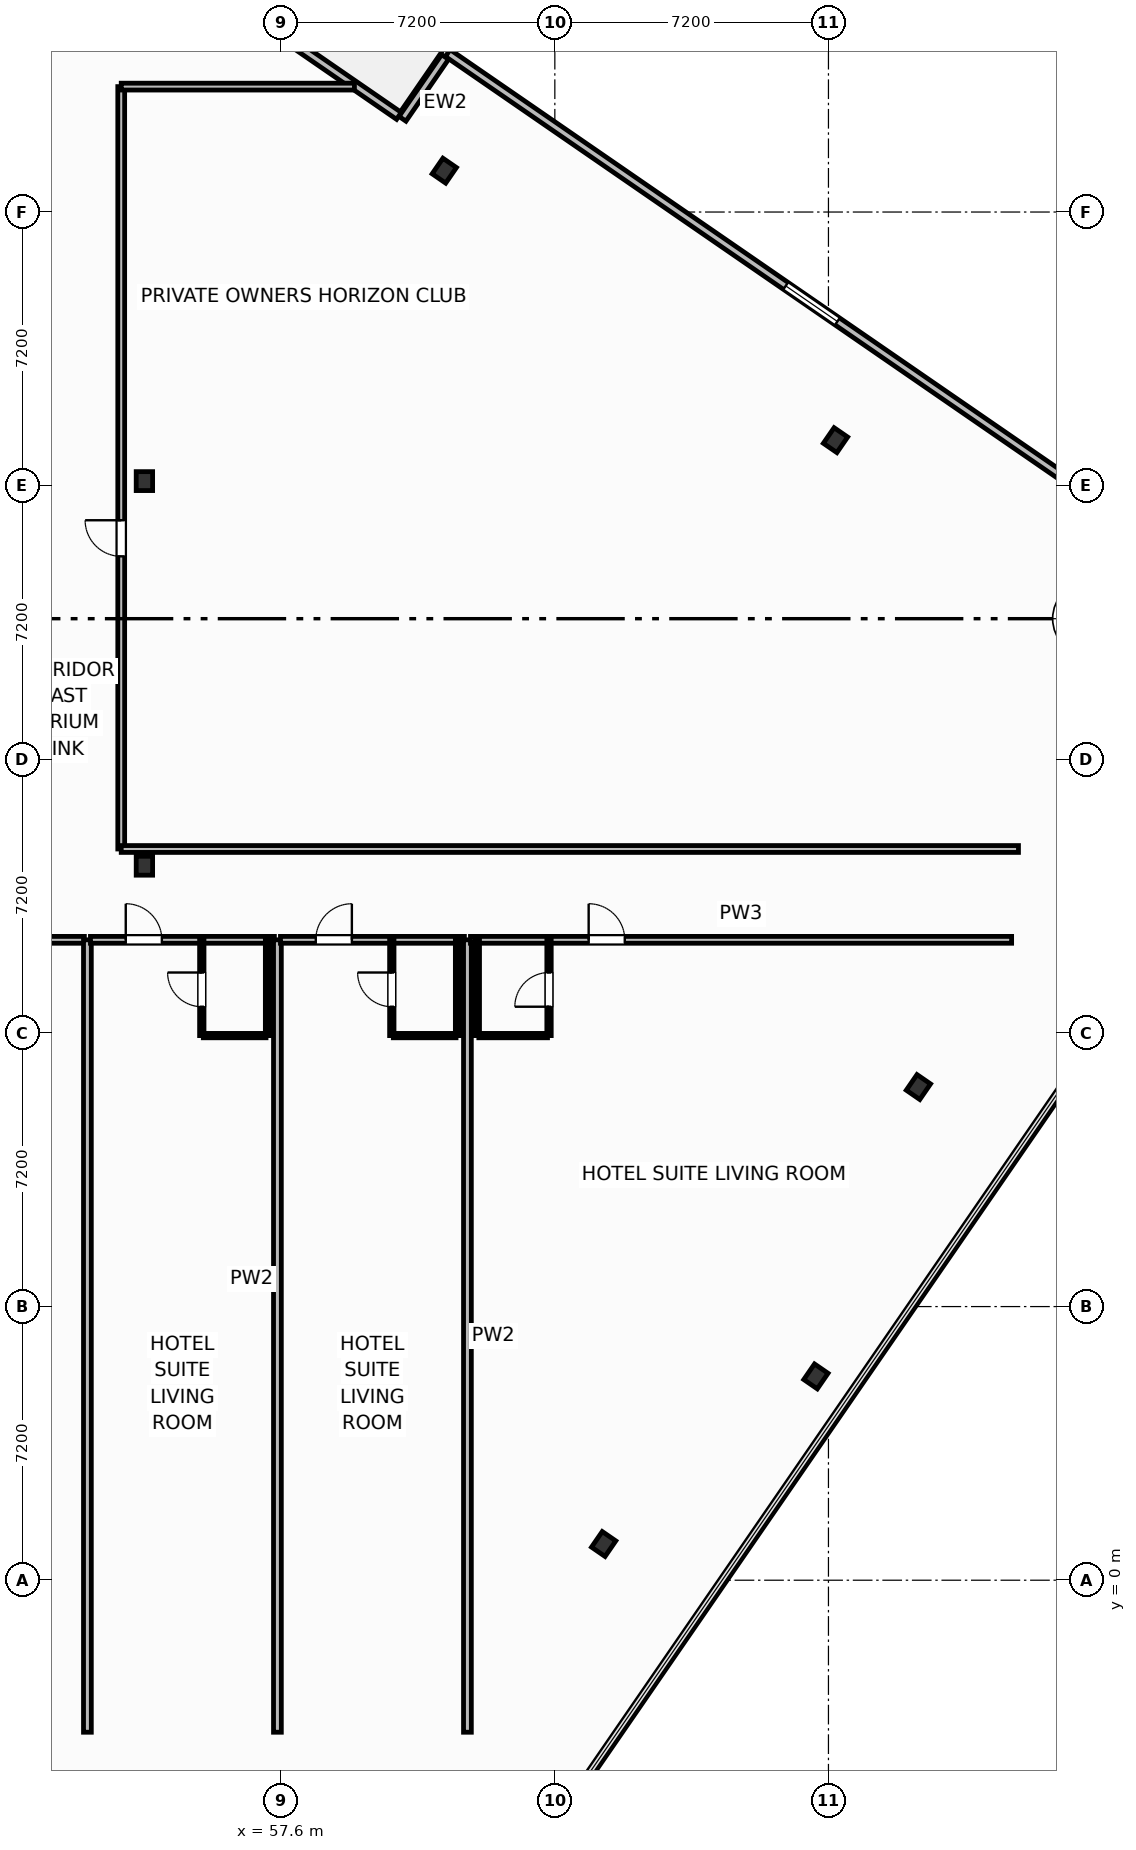
"""IFC4 building model, lengths in metres.
Left out: names, types, materials, properties, quantities, classifications, styles, units other than length and angle.
Written with IfcOpenShell. Run it as: python <this file> out.ifc"""

import sys

from ifc_helpers import new_model, si_unit, direction, frame, frame_2d, origin, origin_2d, place, context, subcontext, project, spatial, rectangle, i_section, extrude, element, fill, save


model = new_model("IFC4")
c1 = context("Model", 3, precision=1e-05, world=origin(), true_north=direction((0.0, 1.0)))
c2 = subcontext(c1, "Body", "Model", "MODEL_VIEW")
j1 = project(units=[si_unit("LENGTHUNIT", "METRE"), si_unit("PLANEANGLEUNIT", "RADIAN")], contexts=[c1])
p1 = place(None, origin())
s1 = spatial("IfcSite", under=j1, at=p1, CompositionType="ELEMENT")
p2 = place(p1, origin())
s2 = spatial("IfcBuilding", under=s1, at=p2, CompositionType="ELEMENT")
p3 = place(p2, frame((0.0, 0.0, 27.0)))
s3 = spatial("IfcBuildingStorey", under=s2, at=p3, CompositionType="ELEMENT", Elevation=27.0)
for number, where, z_axis, x_axis in (
    (1, (54.0, 18.8, 0.0), (0.0, 0.0, 1.0), (1.0, 0.0, 0.0)),
    (2, (54.0, 28.92, 0.0), (0.0, 0.0, 1.0), (1.0, 0.0, 0.0)),
):
    element("IfcColumn", number, at=place(p3, frame(where, z_axis=z_axis, x_axis=x_axis)), inside=s3, PredefinedType="COLUMN", context=c2, shape_type="SweptSolid", body=[
        extrude(i_section(OverallWidth=0.432, OverallDepth=0.498, WebThickness=0.056, FlangeThickness=0.089, FilletRadius=0.025, at=origin_2d()), origin(), (0.0, 0.0, 1.0), 3.7),
    ])
for number, where, z_axis, x_axis in (
    (3, (66.085, 0.953, -0.25), (0.0, 0.0, 1.0), (0.824, -0.567, 0.0)),
    (4, (71.67, 5.363, -0.25), (0.0, 0.0, 1.0), (0.824, -0.567, 0.0)),
    (5, (74.367, 12.976, -0.25), (0.0, 0.0, 1.0), (0.824, -0.567, 0.0)),
    (6, (72.186, 29.997, -0.25), (0.0, 0.0, 1.0), (0.824, -0.567, 0.0)),
    (7, (61.891, 37.088, -0.25), (0.0, 0.0, 1.0), (0.824, -0.567, 0.0)),
):
    element("IfcColumn", number, at=place(p3, frame(where, z_axis=z_axis, x_axis=x_axis)), inside=s3, PredefinedType="COLUMN", context=c2, shape_type="SweptSolid", body=[
        extrude(i_section(OverallWidth=0.432, OverallDepth=0.498, WebThickness=0.056, FlangeThickness=0.089, FilletRadius=0.025, at=origin_2d()), origin(), (0.0, 0.0, 1.0), 3.95),
    ])
p4 = place(p3, frame((55.757, 41.933, 0.0), z_axis=(0.0, 0.0, 1.0), x_axis=(0.823534636215, -0.567265989598, 0.0)))
e8 = element("IfcWall", 8, at=p4, inside=s3, PredefinedType="SOLIDWALL", context=c2, shape_type="SweptSolid", body=[
    extrude(rectangle(XDim=6.0, YDim=0.22, at=frame_2d((3.0, 0.0))), origin(), (0.0, 0.0, 1.0), 2.73),
])
p5 = place(p4, frame((0.4, 0.0, 0.0)))
e9 = element("IfcOpeningElement", 9, at=p5, cuts=e8, PredefinedType="OPENING", context=c2, shape_type="SweptSolid", body=[
    extrude(rectangle(XDim=1.5, YDim=2.25, at=frame_2d((0.75, 1.125))), frame((0.0, 0.12, 0.0), z_axis=(0.0, -1.0, 0.0), x_axis=(1.0, 0.0, 0.0)), (0.0, 0.0, 1.0), 0.24),
])
p6 = place(p3, frame((33.518, -1.362, 0.0), z_axis=(0.0, 0.0, 1.0), x_axis=(0.82353935489, -0.567259139148, 0.0)))
e10 = element("IfcWall", 10, at=p6, inside=s3, PredefinedType="SOLIDWALL", context=c2, shape_type="SweptSolid", body=[
    extrude(rectangle(XDim=23.147, YDim=0.22, at=frame_2d((11.573, 0.0))), origin(), (0.0, 0.0, 1.0), 2.73),
])
p7 = place(p6, frame((10.749, 0.0, 0.8)))
e11 = element("IfcOpeningElement", 11, at=p7, cuts=e10, PredefinedType="OPENING", context=c2, shape_type="SweptSolid", body=[
    extrude(rectangle(XDim=1.65, YDim=1.65, at=frame_2d((0.825, 0.825))), frame((0.0, 0.12, 0.0), z_axis=(0.0, -1.0, 0.0), x_axis=(1.0, 0.0, 0.0)), (0.0, 0.0, 1.0), 0.24),
])
p8 = place(p3, frame((81.127, 26.995, 0.0), z_axis=(0.0, 0.0, 1.0), x_axis=(-0.823530169317, 0.567272474411, 0.0)))
e12 = element("IfcWall", 12, at=p8, inside=s3, PredefinedType="SOLIDWALL", context=c2, shape_type="SweptSolid", body=[
    extrude(rectangle(XDim=23.247, YDim=0.22, at=frame_2d((11.624, 0.0))), origin(), (0.0, 0.0, 1.0), 2.73),
])
p9 = place(p8, frame((10.799, 0.0, 0.8)))
e13 = element("IfcOpeningElement", 13, at=p9, cuts=e12, PredefinedType="OPENING", context=c2, shape_type="SweptSolid", body=[
    extrude(rectangle(XDim=1.65, YDim=1.65, at=frame_2d((0.825, 0.825))), frame((0.0, 0.12, 0.0), z_axis=(0.0, -1.0, 0.0), x_axis=(1.0, 0.0, 0.0)), (0.0, 0.0, 1.0), 0.24),
])
p10 = place(p3, frame((61.912, 40.079, 0.0), z_axis=(0.0, 0.0, 1.0), x_axis=(-0.567189720735, -0.82358716642, 0.0)))
e14 = element("IfcWall", 14, at=p10, inside=s3, PredefinedType="SOLIDWALL", context=c2, shape_type="SweptSolid", body=[
    extrude(rectangle(XDim=1.975, YDim=0.22, at=frame_2d((0.987, 0.0))), origin(), (0.0, 0.0, 1.0), 2.73),
])
p11 = place(p3, frame((47.58, 16.85, 0.0), z_axis=(0.0, 0.0, 1.0), x_axis=(1.0, 0.0, 0.0)))
e15 = element("IfcWall", 15, at=p11, inside=s3, PredefinedType="PARTITIONING", context=c2, shape_type="SweptSolid", body=[
    extrude(rectangle(XDim=4.84, YDim=0.18, at=frame_2d((2.42, 0.0))), origin(), (0.0, 0.0, 1.0), 3.45),
])
p12 = place(p11, frame((2.819, 0.0, 0.0)))
e16 = element("IfcOpeningElement", 16, at=p12, cuts=e15, PredefinedType="OPENING", context=c2, shape_type="SweptSolid", body=[
    extrude(rectangle(XDim=0.95, YDim=2.15, at=frame_2d((0.475, 1.075))), frame((0.0, 0.1, 0.0), z_axis=(0.0, -1.0, 0.0), x_axis=(1.0, 0.0, 0.0)), (0.0, 0.0, 1.0), 0.2),
])
p13 = place(p3, frame((52.5, -4.0, 0.0), z_axis=(0.0, 0.0, 1.0), x_axis=(0.0, 1.0, 0.0)))
e17 = element("IfcWall", 17, at=p13, inside=s3, PredefinedType="PARTITIONING", context=c2, shape_type="SweptSolid", body=[
    extrude(rectangle(XDim=20.85, YDim=0.205, at=frame_2d((10.425, 0.0))), origin(), (0.0, 0.0, 1.0), 3.45),
])
p14 = place(p3, frame((52.58, 16.85, 0.0), z_axis=(0.0, 0.0, 1.0), x_axis=(1.0, 0.0, 0.0)))
e18 = element("IfcWall", 18, at=p14, inside=s3, PredefinedType="PARTITIONING", context=c2, shape_type="SweptSolid", body=[
    extrude(rectangle(XDim=4.84, YDim=0.18, at=frame_2d((2.42, 0.0))), origin(), (0.0, 0.0, 1.0), 3.45),
])
p15 = place(p14, frame((0.929, 0.0, 0.0)))
e19 = element("IfcOpeningElement", 19, at=p15, cuts=e18, PredefinedType="OPENING", context=c2, shape_type="SweptSolid", body=[
    extrude(rectangle(XDim=0.95, YDim=2.15, at=frame_2d((0.475, 1.075))), frame((0.0, 0.1, 0.0), z_axis=(0.0, -1.0, 0.0), x_axis=(1.0, 0.0, 0.0)), (0.0, 0.0, 1.0), 0.2),
])
p16 = place(p3, frame((55.55, 14.33, 0.0), z_axis=(0.0, 0.0, 1.0), x_axis=(1.0, 0.0, 0.0)))
e20 = element("IfcWall", 20, at=p16, inside=s3, PredefinedType="PARTITIONING", context=c2, shape_type="SweptSolid", body=[
    extrude(rectangle(XDim=1.65, YDim=0.115, at=frame_2d((0.825, 0.0))), origin(), (0.0, 0.0, 1.0), 3.45),
])
p17 = place(p3, frame((55.51, 14.33, 0.0), z_axis=(0.0, 0.0, 1.0), x_axis=(0.0, 1.0, 0.0)))
e21 = element("IfcWall", 21, at=p17, inside=s3, PredefinedType="PARTITIONING", context=c2, shape_type="SweptSolid", body=[
    extrude(rectangle(XDim=2.52, YDim=0.115, at=frame_2d((1.26, 0.0))), origin(), (0.0, 0.0, 1.0), 3.45),
])
p18 = place(p17, frame((0.76, 0.0, 0.0)))
e22 = element("IfcOpeningElement", 22, at=p18, cuts=e21, PredefinedType="OPENING", context=c2, shape_type="SweptSolid", body=[
    extrude(rectangle(XDim=0.9, YDim=2.05, at=frame_2d((0.45, 1.025))), frame((0.0, 0.067, 0.0), z_axis=(0.0, -1.0, 0.0), x_axis=(1.0, 0.0, 0.0)), (0.0, 0.0, 1.0), 0.135),
])
p19 = place(p3, frame((57.24, 14.33, 0.0), z_axis=(0.0, 0.0, 1.0), x_axis=(0.0, 1.0, 0.0)))
e23 = element("IfcWall", 23, at=p19, inside=s3, PredefinedType="PARTITIONING", context=c2, shape_type="SweptSolid", body=[
    extrude(rectangle(XDim=2.52, YDim=0.115, at=frame_2d((1.26, 0.0))), origin(), (0.0, 0.0, 1.0), 3.45),
])
p20 = place(p3, frame((57.5, -4.0, 0.0), z_axis=(0.0, 0.0, 1.0), x_axis=(0.0, 1.0, 0.0)))
e24 = element("IfcWall", 24, at=p20, inside=s3, PredefinedType="PARTITIONING", context=c2, shape_type="SweptSolid", body=[
    extrude(rectangle(XDim=20.85, YDim=0.205, at=frame_2d((10.425, 0.0))), origin(), (0.0, 0.0, 1.0), 3.45),
])
p21 = place(p3, frame((57.58, 16.85, 0.0), z_axis=(0.0, 0.0, 1.0), x_axis=(1.0, 0.0, 0.0)))
e25 = element("IfcWall", 25, at=p21, inside=s3, PredefinedType="PARTITIONING", context=c2, shape_type="SweptSolid", body=[
    extrude(rectangle(XDim=4.84, YDim=0.18, at=frame_2d((2.42, 0.0))), origin(), (0.0, 0.0, 1.0), 2.58),
])
p22 = place(p21, frame((0.929, 0.0, 0.0)))
e26 = element("IfcOpeningElement", 26, at=p22, cuts=e25, PredefinedType="OPENING", context=c2, shape_type="SweptSolid", body=[
    extrude(rectangle(XDim=0.95, YDim=2.15, at=frame_2d((0.475, 1.075))), frame((0.0, 0.1, 0.0), z_axis=(0.0, -1.0, 0.0), x_axis=(1.0, 0.0, 0.0)), (0.0, 0.0, 1.0), 0.2),
])
p23 = place(p3, frame((60.55, 14.33, 0.0), z_axis=(0.0, 0.0, 1.0), x_axis=(1.0, 0.0, 0.0)))
e27 = element("IfcWall", 27, at=p23, inside=s3, PredefinedType="PARTITIONING", context=c2, shape_type="SweptSolid", body=[
    extrude(rectangle(XDim=1.65, YDim=0.115, at=frame_2d((0.825, 0.0))), origin(), (0.0, 0.0, 1.0), 3.45),
])
p24 = place(p3, frame((60.51, 14.33, 0.0), z_axis=(0.0, 0.0, 1.0), x_axis=(0.0, 1.0, 0.0)))
e28 = element("IfcWall", 28, at=p24, inside=s3, PredefinedType="PARTITIONING", context=c2, shape_type="SweptSolid", body=[
    extrude(rectangle(XDim=2.52, YDim=0.115, at=frame_2d((1.26, 0.0))), origin(), (0.0, 0.0, 1.0), 3.45),
])
p25 = place(p24, frame((0.76, 0.0, 0.0)))
e29 = element("IfcOpeningElement", 29, at=p25, cuts=e28, PredefinedType="OPENING", context=c2, shape_type="SweptSolid", body=[
    extrude(rectangle(XDim=0.9, YDim=2.05, at=frame_2d((0.45, 1.025))), frame((0.0, 0.067, 0.0), z_axis=(0.0, -1.0, 0.0), x_axis=(1.0, 0.0, 0.0)), (0.0, 0.0, 1.0), 0.135),
])
p26 = place(p3, frame((62.24, 14.33, 0.0), z_axis=(0.0, 0.0, 1.0), x_axis=(0.0, 1.0, 0.0)))
e30 = element("IfcWall", 30, at=p26, inside=s3, PredefinedType="PARTITIONING", context=c2, shape_type="SweptSolid", body=[
    extrude(rectangle(XDim=2.52, YDim=0.115, at=frame_2d((1.26, 0.0))), origin(), (0.0, 0.0, 1.0), 3.45),
])
p27 = place(p3, frame((62.5, -4.0, 0.0), z_axis=(0.0, 0.0, 1.0), x_axis=(0.0, 1.0, 0.0)))
e31 = element("IfcWall", 31, at=p27, inside=s3, PredefinedType="PARTITIONING", context=c2, shape_type="SweptSolid", body=[
    extrude(rectangle(XDim=20.85, YDim=0.205, at=frame_2d((10.425, 0.0))), origin(), (0.0, 0.0, 1.0), 3.45),
])
p28 = place(p3, frame((62.58, 16.85, 0.0), z_axis=(0.0, 0.0, 1.0), x_axis=(1.0, 0.0, 0.0)))
e32 = element("IfcWall", 32, at=p28, inside=s3, PredefinedType="PARTITIONING", context=c2, shape_type="SweptSolid", body=[
    extrude(rectangle(XDim=14.24, YDim=0.18, at=frame_2d((7.12, 0.0))), origin(), (0.0, 0.0, 1.0), 3.45),
])
p29 = place(p28, frame((3.11, 0.0, 0.0)))
e33 = element("IfcOpeningElement", 33, at=p29, cuts=e32, PredefinedType="OPENING", context=c2, shape_type="SweptSolid", body=[
    extrude(rectangle(XDim=0.95, YDim=2.15, at=frame_2d((0.475, 1.075))), frame((0.0, 0.1, 0.0), z_axis=(0.0, -1.0, 0.0), x_axis=(1.0, 0.0, 0.0)), (0.0, 0.0, 1.0), 0.2),
])
p30 = place(p3, frame((62.8, 14.33, 0.0), z_axis=(0.0, 0.0, 1.0), x_axis=(1.0, 0.0, 0.0)))
e34 = element("IfcWall", 34, at=p30, inside=s3, PredefinedType="PARTITIONING", context=c2, shape_type="SweptSolid", body=[
    extrude(rectangle(XDim=1.807, YDim=0.115, at=frame_2d((0.904, 0.0))), origin(), (0.0, 0.0, 1.0), 3.45),
])
p31 = place(p3, frame((64.647, 14.33, 0.0), z_axis=(0.0, 0.0, 1.0), x_axis=(0.0, 1.0, 0.0)))
e35 = element("IfcWall", 35, at=p31, inside=s3, PredefinedType="PARTITIONING", context=c2, shape_type="SweptSolid", body=[
    extrude(rectangle(XDim=2.52, YDim=0.115, at=frame_2d((1.26, 0.0))), origin(), (0.0, 0.0, 1.0), 3.45),
])
p32 = place(p31, frame((0.76, 0.0, 0.0)))
e36 = element("IfcOpeningElement", 36, at=p32, cuts=e35, PredefinedType="OPENING", context=c2, shape_type="SweptSolid", body=[
    extrude(rectangle(XDim=0.9, YDim=2.05, at=frame_2d((0.45, 1.025))), frame((0.0, 0.067, 0.0), z_axis=(0.0, -1.0, 0.0), x_axis=(1.0, 0.0, 0.0)), (0.0, 0.0, 1.0), 0.135),
])
p33 = place(p3, frame((62.76, 14.33, 0.0), z_axis=(0.0, 0.0, 1.0), x_axis=(0.0, 1.0, 0.0)))
e37 = element("IfcWall", 37, at=p33, inside=s3, PredefinedType="PARTITIONING", context=c2, shape_type="SweptSolid", body=[
    extrude(rectangle(XDim=2.52, YDim=0.115, at=frame_2d((1.26, 0.0))), origin(), (0.0, 0.0, 1.0), 3.45),
])
p34 = place(p3, frame((53.39, 19.24, 0.0), z_axis=(0.0, 0.0, 1.0), x_axis=(0.0, 1.0, 0.0)))
e38 = element("IfcWall", 38, at=p34, inside=s3, PredefinedType="PARTITIONING", context=c2, shape_type="SweptSolid", body=[
    extrude(rectangle(XDim=20.06, YDim=0.18, at=frame_2d((10.03, 0.0))), origin(), (0.0, 0.0, 1.0), 3.45),
])
p35 = place(p34, frame((7.7, 0.0, 0.0)))
e39 = element("IfcOpeningElement", 39, at=p35, cuts=e38, PredefinedType="OPENING", context=c2, shape_type="SweptSolid", body=[
    extrude(rectangle(XDim=0.95, YDim=2.05, at=frame_2d((0.475, 1.025))), frame((0.0, 0.1, 0.0), z_axis=(0.0, -1.0, 0.0), x_axis=(1.0, 0.0, 0.0)), (0.0, 0.0, 1.0), 0.2),
])
p36 = place(p3, frame((53.39, 19.24, 0.0), z_axis=(0.0, 0.0, 1.0), x_axis=(1.0, 0.0, 0.0)))
e40 = element("IfcWall", 40, at=p36, inside=s3, PredefinedType="PARTITIONING", context=c2, shape_type="SweptSolid", body=[
    extrude(rectangle(XDim=23.61, YDim=0.18, at=frame_2d((11.805, 0.0))), origin(), (0.0, 0.0, 1.0), 3.45),
])
p37 = place(p3, frame((53.39, 39.3, 0.0), z_axis=(0.0, 0.0, 1.0), x_axis=(1.0, 0.0, 0.0)))
e41 = element("IfcWall", 41, at=p37, inside=s3, PredefinedType="PARTITIONING", context=c2, shape_type="SweptSolid", body=[
    extrude(rectangle(XDim=6.136, YDim=0.18, at=frame_2d((3.068, 0.0))), origin(), (0.0, 0.0, 1.0), 3.45),
])
p38 = place(p9, origin())
e42 = element("IfcWindow", 42, at=p38, inside=s3, PartitioningType="SINGLE_PANEL", PredefinedType="WINDOW", context=c2, shape_type="SweptSolid", body=[
    extrude(rectangle(XDim=1.65, YDim=1.65, at=frame_2d((0.825, 0.825))), frame((0.0, 0.03, 0.0), z_axis=(0.0, -1.0, 0.0), x_axis=(1.0, 0.0, 0.0)), (0.0, 0.0, 1.0), 0.06),
])
fill(e13, e42)
p39 = place(p15, origin())
e43 = element("IfcDoor", 43, at=p39, inside=s3, OperationType="SINGLE_SWING_LEFT", PredefinedType="DOOR", context=c2, shape_type="SweptSolid", body=[
    extrude(rectangle(XDim=0.95, YDim=2.15, at=frame_2d((0.475, 1.075))), frame((0.0, 0.025, 0.0), z_axis=(0.0, -1.0, 0.0), x_axis=(1.0, 0.0, 0.0)), (0.0, 0.0, 1.0), 0.05),
])
fill(e19, e43)
p40 = place(p18, origin())
e44 = element("IfcDoor", 44, at=p40, inside=s3, OperationType="SINGLE_SWING_RIGHT", PredefinedType="DOOR", context=c2, shape_type="SweptSolid", body=[
    extrude(rectangle(XDim=0.9, YDim=2.05, at=frame_2d((0.45, 1.025))), frame((0.0, 0.025, 0.0), z_axis=(0.0, -1.0, 0.0), x_axis=(1.0, 0.0, 0.0)), (0.0, 0.0, 1.0), 0.05),
])
fill(e22, e44)
p41 = place(p22, origin())
e45 = element("IfcDoor", 45, at=p41, inside=s3, OperationType="SINGLE_SWING_RIGHT", PredefinedType="DOOR", context=c2, shape_type="SweptSolid", body=[
    extrude(rectangle(XDim=0.95, YDim=2.15, at=frame_2d((0.475, 1.075))), frame((0.0, 0.025, 0.0), z_axis=(0.0, -1.0, 0.0), x_axis=(1.0, 0.0, 0.0)), (0.0, 0.0, 1.0), 0.05),
])
fill(e26, e45)
p42 = place(p25, origin())
e46 = element("IfcDoor", 46, at=p42, inside=s3, OperationType="SINGLE_SWING_RIGHT", PredefinedType="DOOR", context=c2, shape_type="SweptSolid", body=[
    extrude(rectangle(XDim=0.9, YDim=2.05, at=frame_2d((0.45, 1.025))), frame((0.0, 0.025, 0.0), z_axis=(0.0, -1.0, 0.0), x_axis=(1.0, 0.0, 0.0)), (0.0, 0.0, 1.0), 0.05),
])
fill(e29, e46)
p43 = place(p29, origin())
e47 = element("IfcDoor", 47, at=p43, inside=s3, OperationType="SINGLE_SWING_LEFT", PredefinedType="DOOR", context=c2, shape_type="SweptSolid", body=[
    extrude(rectangle(XDim=0.95, YDim=2.15, at=frame_2d((0.475, 1.075))), frame((0.0, 0.025, 0.0), z_axis=(0.0, -1.0, 0.0), x_axis=(1.0, 0.0, 0.0)), (0.0, 0.0, 1.0), 0.05),
])
fill(e33, e47)
p44 = place(p32, origin())
e48 = element("IfcDoor", 48, at=p44, inside=s3, OperationType="SINGLE_SWING_LEFT", PredefinedType="DOOR", context=c2, shape_type="SweptSolid", body=[
    extrude(rectangle(XDim=0.9, YDim=2.05, at=frame_2d((0.45, 1.025))), frame((0.0, 0.025, 0.0), z_axis=(0.0, -1.0, 0.0), x_axis=(1.0, 0.0, 0.0)), (0.0, 0.0, 1.0), 0.05),
])
fill(e36, e48)
p45 = place(p35, origin())
e49 = element("IfcDoor", 49, at=p45, inside=s3, OperationType="SINGLE_SWING_RIGHT", PredefinedType="DOOR", context=c2, shape_type="SweptSolid", body=[
    extrude(rectangle(XDim=0.95, YDim=2.05, at=frame_2d((0.475, 1.025))), frame((0.0, 0.025, 0.0), z_axis=(0.0, -1.0, 0.0), x_axis=(1.0, 0.0, 0.0)), (0.0, 0.0, 1.0), 0.05),
])
fill(e39, e49)
save(model, sys.argv[1])
